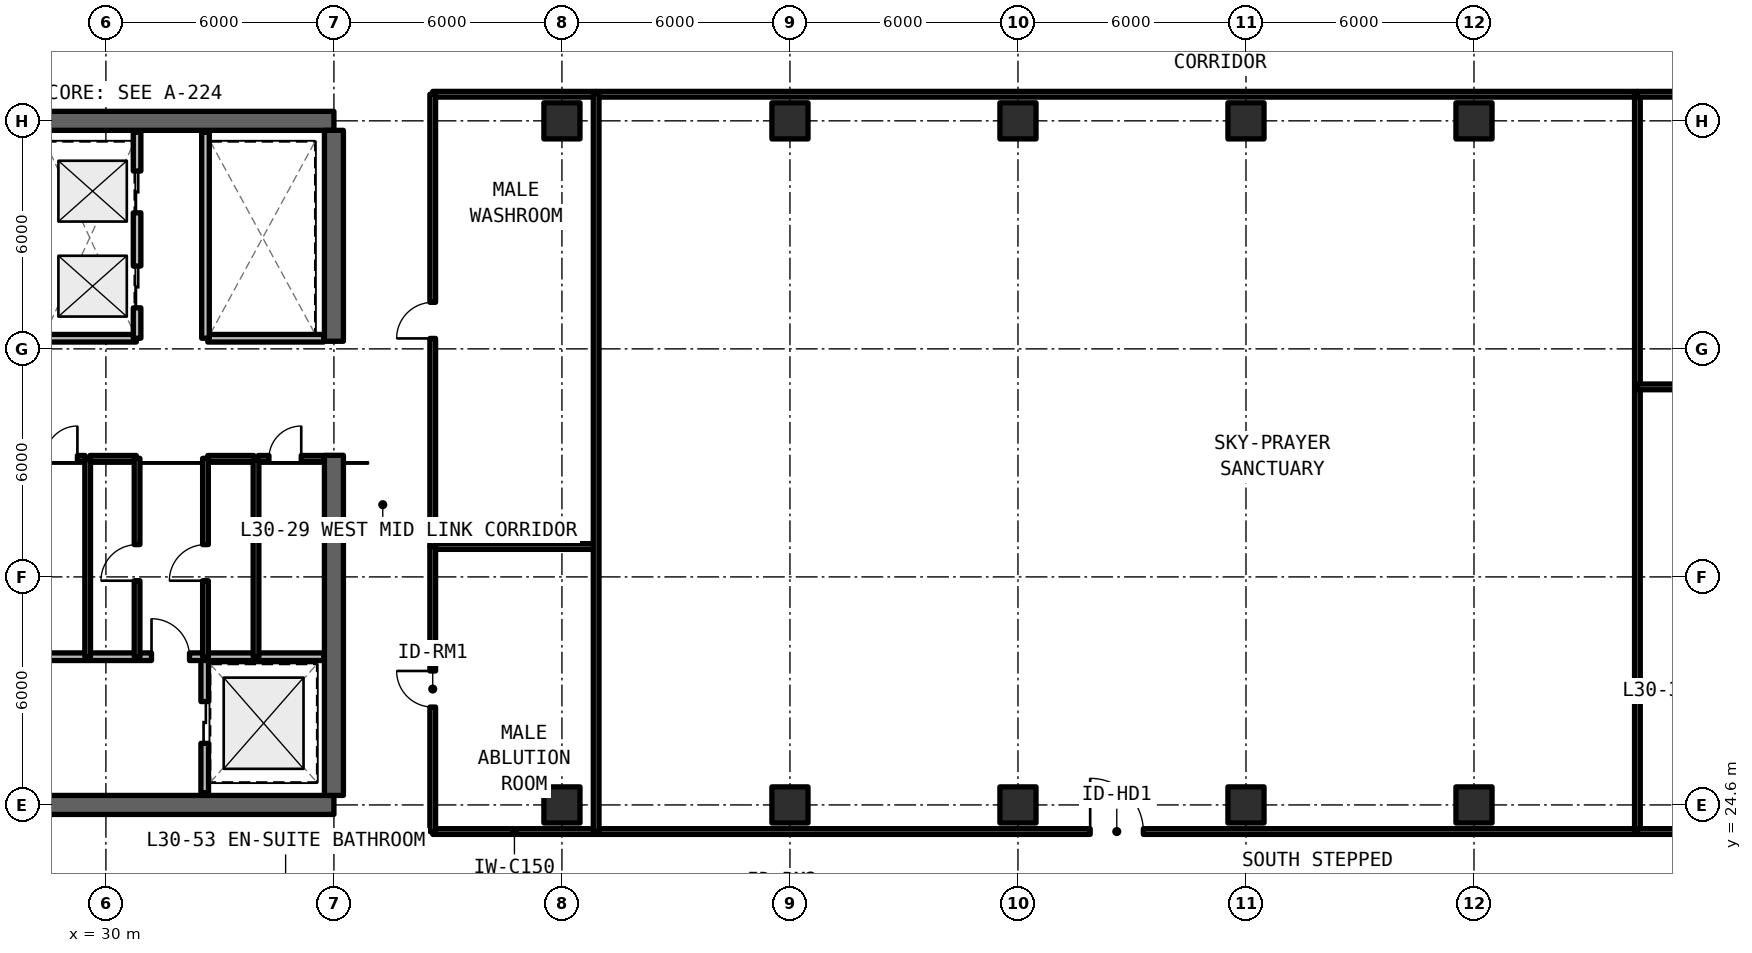
"""IFC4 building model, lengths in metres.
Left out: names, types, materials, properties, quantities, classifications, styles, units other than length and angle.
Written with IfcOpenShell. Run it as: python <this file> out.ifc"""

import sys

from ifc_helpers import new_model, si_unit, direction, frame, frame_2d, origin, origin_2d, place, context, subcontext, project, spatial, rectangle, extrude, element, fill, save


model = new_model("IFC4")
c1 = context("Model", 3, precision=1e-05, world=origin(), true_north=direction((0.0, 1.0)))
c2 = subcontext(c1, "Body", "Model", "MODEL_VIEW")
j1 = project(units=[si_unit("LENGTHUNIT", "METRE"), si_unit("PLANEANGLEUNIT", "RADIAN")], contexts=[c1])
p1 = place(None, origin())
s1 = spatial("IfcSite", under=j1, at=p1, CompositionType="ELEMENT")
p2 = place(p1, origin())
s2 = spatial("IfcBuilding", under=s1, at=p2, CompositionType="ELEMENT")
p3 = place(p2, frame((0.0, 0.0, 108.57)))
s3 = spatial("IfcBuildingStorey", under=s2, at=p3, CompositionType="ELEMENT", Elevation=108.57)
for number, where, z_axis, x_axis in (
    (1, (24.0, 24.6, 0.0), (0.0, 0.0, 1.0), (1.0, 0.0, 0.0)),
    (2, (36.0, 42.6, 0.0), (0.0, 0.0, 1.0), (-1.0, 0.0, 0.0)),
):
    element("IfcWall", number, at=place(p3, frame(where, z_axis=z_axis, x_axis=x_axis)), inside=s3, PredefinedType="SHEAR", context=c2, shape_type="SweptSolid", body=[
        extrude(rectangle(XDim=12.0, YDim=0.5, at=frame_2d((6.0, 0.0))), origin(), (0.0, 0.0, 1.0), 3.63),
    ])
p4 = place(p3, frame((36.0, 24.85, 0.0), z_axis=(0.0, 0.0, 1.0), x_axis=(0.0, 1.0, 0.0)))
e3 = element("IfcWall", 3, at=p4, inside=s3, PredefinedType="SHEAR", context=c2, shape_type="SweptSolid", body=[
    extrude(rectangle(XDim=8.95, YDim=0.5, at=frame_2d((4.475, 0.0))), origin(), (0.0, 0.0, 1.0), 3.63),
])
p5 = place(p3, frame((36.0, 36.8, 0.0), z_axis=(0.0, 0.0, 1.0), x_axis=(0.0, 1.0, 0.0)))
e4 = element("IfcWall", 4, at=p5, inside=s3, PredefinedType="SHEAR", context=c2, shape_type="SweptSolid", body=[
    extrude(rectangle(XDim=5.55, YDim=0.5, at=frame_2d((2.775, 0.0))), origin(), (0.0, 0.0, 1.0), 3.63),
])
for number, where, z_axis, x_axis in (
    (5, (42.0, 24.6, 0.0), (0.0, 0.0, 1.0), (1.0, 0.0, 0.0)),
    (6, (42.0, 42.6, 0.0), (0.0, 0.0, 1.0), (1.0, 0.0, 0.0)),
    (7, (48.0, 24.6, 0.0), (0.0, 0.0, 1.0), (1.0, 0.0, 0.0)),
    (8, (48.0, 42.6, 0.0), (0.0, 0.0, 1.0), (1.0, 0.0, 0.0)),
    (9, (54.0, 24.6, 0.0), (0.0, 0.0, 1.0), (1.0, 0.0, 0.0)),
    (10, (54.0, 42.6, 0.0), (0.0, 0.0, 1.0), (1.0, 0.0, 0.0)),
    (11, (60.0, 24.6, 0.0), (0.0, 0.0, 1.0), (1.0, 0.0, 0.0)),
    (12, (60.0, 42.6, 0.0), (0.0, 0.0, 1.0), (1.0, 0.0, 0.0)),
    (13, (66.0, 24.6, 0.0), (0.0, 0.0, 1.0), (1.0, 0.0, 0.0)),
    (14, (66.0, 42.6, 0.0), (0.0, 0.0, 1.0), (1.0, 0.0, 0.0)),
):
    element("IfcColumn", number, at=place(p3, frame(where, z_axis=z_axis, x_axis=x_axis)), inside=s3, PredefinedType="COLUMN", context=c2, shape_type="SweptSolid", body=[
        extrude(rectangle(XDim=0.95, YDim=0.95, at=origin_2d()), origin(), (0.0, 0.0, 1.0), 3.63),
    ])
p6 = place(p3, frame((32.6, 24.92, 0.0), z_axis=(0.0, 0.0, 1.0), x_axis=(0.0, 1.0, 0.0)))
e15 = element("IfcWall", 15, at=p6, inside=s3, PredefinedType="SOLIDWALL", context=c2, shape_type="SweptSolid", body=[
    extrude(rectangle(XDim=3.58, YDim=0.2, at=frame_2d((1.79, 0.0))), origin(), (0.0, 0.0, 1.0), 2.63),
])
p7 = place(p6, frame((1.3, 0.0, 0.0)))
e16 = element("IfcOpeningElement", 16, at=p7, cuts=e15, PredefinedType="OPENING", context=c2, shape_type="SweptSolid", body=[
    extrude(rectangle(XDim=1.1, YDim=2.2, at=frame_2d((0.55, 1.1))), frame((0.0, 0.11, 0.0), z_axis=(0.0, -1.0, 0.0), x_axis=(1.0, 0.0, 0.0)), (0.0, 0.0, 1.0), 0.22),
])
p8 = place(p3, frame((28.22, 28.5, 0.0), z_axis=(0.0, 0.0, 1.0), x_axis=(1.0, 0.0, 0.0)))
e17 = element("IfcWall", 17, at=p8, inside=s3, PredefinedType="SOLIDWALL", context=c2, shape_type="SweptSolid", body=[
    extrude(rectangle(XDim=7.51, YDim=0.2, at=frame_2d((3.755, 0.0))), origin(), (0.0, 0.0, 1.0), 2.63),
])
p9 = place(p8, frame((2.98, 0.0, 0.0)))
e18 = element("IfcOpeningElement", 18, at=p9, cuts=e17, PredefinedType="OPENING", context=c2, shape_type="SweptSolid", body=[
    extrude(rectangle(XDim=1.0, YDim=2.15, at=frame_2d((0.5, 1.075))), frame((0.0, 0.11, 0.0), z_axis=(0.0, -1.0, 0.0), x_axis=(1.0, 0.0, 0.0)), (0.0, 0.0, 1.0), 0.22),
])
p10 = place(p3, frame((29.52, 28.5, 0.0), z_axis=(0.0, 0.0, 1.0), x_axis=(0.0, 1.0, 0.0)))
e19 = element("IfcWall", 19, at=p10, inside=s3, PredefinedType="SOLIDWALL", context=c2, shape_type="SweptSolid", body=[
    extrude(rectangle(XDim=5.22, YDim=0.15, at=frame_2d((2.61, 0.0))), origin(), (0.0, 0.0, 1.0), 2.63),
])
p11 = place(p3, frame((28.22, 33.72, 0.0), z_axis=(0.0, 0.0, 1.0), x_axis=(1.0, 0.0, 0.0)))
e20 = element("IfcWall", 20, at=p11, inside=s3, PredefinedType="SOLIDWALL", context=c2, shape_type="SweptSolid", body=[
    extrude(rectangle(XDim=1.23, YDim=0.15, at=frame_2d((0.615, 0.0))), origin(), (0.0, 0.0, 1.0), 2.63),
])
p12 = place(p11, frame((0.18, 0.0, 0.0)))
e21 = element("IfcOpeningElement", 21, at=p12, cuts=e20, PredefinedType="OPENING", context=c2, shape_type="SweptSolid", body=[
    extrude(rectangle(XDim=0.85, YDim=2.1, at=frame_2d((0.425, 1.05))), frame((0.0, 0.085, 0.0), z_axis=(0.0, -1.0, 0.0), x_axis=(1.0, 0.0, 0.0)), (0.0, 0.0, 1.0), 0.17),
])
p13 = place(p3, frame((29.58, 33.72, 0.0), z_axis=(0.0, 0.0, 1.0), x_axis=(1.0, 0.0, 0.0)))
e22 = element("IfcWall", 22, at=p13, inside=s3, PredefinedType="SOLIDWALL", context=c2, shape_type="SweptSolid", body=[
    extrude(rectangle(XDim=1.22, YDim=0.15, at=frame_2d((0.61, 0.0))), origin(), (0.0, 0.0, 1.0), 2.63),
])
p14 = place(p3, frame((30.82, 28.5, 0.0), z_axis=(0.0, 0.0, 1.0), x_axis=(0.0, 1.0, 0.0)))
e23 = element("IfcWall", 23, at=p14, inside=s3, PredefinedType="SOLIDWALL", context=c2, shape_type="SweptSolid", body=[
    extrude(rectangle(XDim=5.22, YDim=0.15, at=frame_2d((2.61, 0.0))), origin(), (0.0, 0.0, 1.0), 2.63),
])
p15 = place(p14, frame((2.0, 0.0, 0.0)))
e24 = element("IfcOpeningElement", 24, at=p15, cuts=e23, PredefinedType="OPENING", context=c2, shape_type="SweptSolid", body=[
    extrude(rectangle(XDim=0.95, YDim=2.15, at=frame_2d((0.475, 1.075))), frame((0.0, 0.085, 0.0), z_axis=(0.0, -1.0, 0.0), x_axis=(1.0, 0.0, 0.0)), (0.0, 0.0, 1.0), 0.17),
])
p16 = place(p3, frame((33.95, 28.5, 0.0), z_axis=(0.0, 0.0, 1.0), x_axis=(0.0, 1.0, 0.0)))
e25 = element("IfcWall", 25, at=p16, inside=s3, PredefinedType="SOLIDWALL", context=c2, shape_type="SweptSolid", body=[
    extrude(rectangle(XDim=5.22, YDim=0.15, at=frame_2d((2.61, 0.0))), origin(), (0.0, 0.0, 1.0), 2.63),
])
p17 = place(p3, frame((32.68, 33.72, 0.0), z_axis=(0.0, 0.0, 1.0), x_axis=(1.0, 0.0, 0.0)))
e26 = element("IfcWall", 26, at=p17, inside=s3, PredefinedType="SOLIDWALL", context=c2, shape_type="SweptSolid", body=[
    extrude(rectangle(XDim=1.21, YDim=0.15, at=frame_2d((0.605, 0.0))), origin(), (0.0, 0.0, 1.0), 2.63),
])
p18 = place(p3, frame((34.01, 33.72, 0.0), z_axis=(0.0, 0.0, 1.0), x_axis=(1.0, 0.0, 0.0)))
e27 = element("IfcWall", 27, at=p18, inside=s3, PredefinedType="SOLIDWALL", context=c2, shape_type="SweptSolid", body=[
    extrude(rectangle(XDim=1.72, YDim=0.15, at=frame_2d((0.86, 0.0))), origin(), (0.0, 0.0, 1.0), 2.63),
])
p19 = place(p18, frame((0.28, 0.0, 0.0)))
e28 = element("IfcOpeningElement", 28, at=p19, cuts=e27, PredefinedType="OPENING", context=c2, shape_type="SweptSolid", body=[
    extrude(rectangle(XDim=0.85, YDim=2.1, at=frame_2d((0.425, 1.05))), frame((0.0, 0.085, 0.0), z_axis=(0.0, -1.0, 0.0), x_axis=(1.0, 0.0, 0.0)), (0.0, 0.0, 1.0), 0.17),
])
p20 = place(p3, frame((32.62, 28.5, 0.0), z_axis=(0.0, 0.0, 1.0), x_axis=(0.0, 1.0, 0.0)))
e29 = element("IfcWall", 29, at=p20, inside=s3, PredefinedType="SOLIDWALL", context=c2, shape_type="SweptSolid", body=[
    extrude(rectangle(XDim=5.22, YDim=0.15, at=frame_2d((2.61, 0.0))), origin(), (0.0, 0.0, 1.0), 2.63),
])
p21 = place(p20, frame((2.0, 0.0, 0.0)))
e30 = element("IfcOpeningElement", 30, at=p21, cuts=e29, PredefinedType="OPENING", context=c2, shape_type="SweptSolid", body=[
    extrude(rectangle(XDim=0.95, YDim=2.15, at=frame_2d((0.475, 1.075))), frame((0.0, 0.085, 0.0), z_axis=(0.0, -1.0, 0.0), x_axis=(1.0, 0.0, 0.0)), (0.0, 0.0, 1.0), 0.17),
])
p22 = place(p3, frame((28.22, 36.88, 0.0), z_axis=(0.0, 0.0, 1.0), x_axis=(1.0, 0.0, 0.0)))
e31 = element("IfcWall", 31, at=p22, inside=s3, PredefinedType="SOLIDWALL", context=c2, shape_type="SweptSolid", body=[
    extrude(rectangle(XDim=2.58, YDim=0.2, at=frame_2d((1.29, 0.0))), origin(), (0.0, 0.0, 1.0), 2.63),
])
p23 = place(p3, frame((30.82, 36.88, 0.0), z_axis=(0.0, 0.0, 1.0), x_axis=(0.0, 1.0, 0.0)))
e32 = element("IfcWall", 32, at=p23, inside=s3, PredefinedType="SOLIDWALL", context=c2, shape_type="SweptSolid", body=[
    extrude(rectangle(XDim=5.42, YDim=0.2, at=frame_2d((2.71, 0.0))), origin(), (0.0, 0.0, 1.0), 2.63),
])
p24 = place(p23, frame((0.8, 0.0, 0.0)))
e33 = element("IfcOpeningElement", 33, at=p24, cuts=e32, PredefinedType="OPENING", context=c2, shape_type="SweptSolid", body=[
    extrude(rectangle(XDim=1.1, YDim=2.2, at=frame_2d((0.55, 1.1))), frame((0.0, 0.11, 0.0), z_axis=(0.0, -1.0, 0.0), x_axis=(1.0, 0.0, 0.0)), (0.0, 0.0, 1.0), 0.22),
])
p25 = place(p23, frame((3.3, 0.0, 0.0)))
e34 = element("IfcOpeningElement", 34, at=p25, cuts=e32, PredefinedType="OPENING", context=c2, shape_type="SweptSolid", body=[
    extrude(rectangle(XDim=1.1, YDim=2.2, at=frame_2d((0.55, 1.1))), frame((0.0, 0.11, 0.0), z_axis=(0.0, -1.0, 0.0), x_axis=(1.0, 0.0, 0.0)), (0.0, 0.0, 1.0), 0.22),
])
p26 = place(p3, frame((32.68, 36.88, 0.0), z_axis=(0.0, 0.0, 1.0), x_axis=(1.0, 0.0, 0.0)))
e35 = element("IfcWall", 35, at=p26, inside=s3, PredefinedType="SOLIDWALL", context=c2, shape_type="SweptSolid", body=[
    extrude(rectangle(XDim=3.05, YDim=0.2, at=frame_2d((1.525, 0.0))), origin(), (0.0, 0.0, 1.0), 2.63),
])
p27 = place(p3, frame((32.62, 36.88, 0.0), z_axis=(0.0, 0.0, 1.0), x_axis=(0.0, 1.0, 0.0)))
e36 = element("IfcWall", 36, at=p27, inside=s3, PredefinedType="SOLIDWALL", context=c2, shape_type="SweptSolid", body=[
    extrude(rectangle(XDim=5.42, YDim=0.2, at=frame_2d((2.71, 0.0))), origin(), (0.0, 0.0, 1.0), 2.63),
])
for number, where, z_axis, x_axis in (
    (37, (38.6, 23.9, 0.0), (0.0, 0.0, 1.0), (1.0, 0.0, 0.0)),
    (38, (38.6, 31.4, 0.0), (0.0, 0.0, 1.0), (1.0, 0.0, 0.0)),
):
    element("IfcWall", number, at=place(p3, frame(where, z_axis=z_axis, x_axis=x_axis)), inside=s3, PredefinedType="SOLIDWALL", context=c2, shape_type="SweptSolid", body=[
        extrude(rectangle(XDim=4.3, YDim=0.15, at=frame_2d((2.15, 0.0))), origin(), (0.0, 0.0, 1.0), 2.63),
    ])
p28 = place(p3, frame((38.6, 23.9, 0.0), z_axis=(0.0, 0.0, 1.0), x_axis=(0.0, 1.0, 0.0)))
e39 = element("IfcWall", 39, at=p28, inside=s3, PredefinedType="SOLIDWALL", context=c2, shape_type="SweptSolid", body=[
    extrude(rectangle(XDim=7.5, YDim=0.15, at=frame_2d((3.75, 0.0))), origin(), (0.0, 0.0, 1.0), 2.63),
])
p29 = place(p28, frame((3.275, 0.0, 0.0)))
e40 = element("IfcOpeningElement", 40, at=p29, cuts=e39, PredefinedType="OPENING", context=c2, shape_type="SweptSolid", body=[
    extrude(rectangle(XDim=0.95, YDim=2.15, at=frame_2d((0.475, 1.075))), frame((0.0, 0.085, 0.0), z_axis=(0.0, -1.0, 0.0), x_axis=(1.0, 0.0, 0.0)), (0.0, 0.0, 1.0), 0.17),
])
p30 = place(p3, frame((38.6, 43.3, 0.0), z_axis=(0.0, 0.0, 1.0), x_axis=(1.0, 0.0, 0.0)))
e41 = element("IfcWall", 41, at=p30, inside=s3, PredefinedType="SOLIDWALL", context=c2, shape_type="SweptSolid", body=[
    extrude(rectangle(XDim=4.3, YDim=0.15, at=frame_2d((2.15, 0.0))), origin(), (0.0, 0.0, 1.0), 2.63),
])
p31 = place(p3, frame((38.6, 31.4, 0.0), z_axis=(0.0, 0.0, 1.0), x_axis=(0.0, 1.0, 0.0)))
e42 = element("IfcWall", 42, at=p31, inside=s3, PredefinedType="SOLIDWALL", context=c2, shape_type="SweptSolid", body=[
    extrude(rectangle(XDim=11.9, YDim=0.15, at=frame_2d((5.95, 0.0))), origin(), (0.0, 0.0, 1.0), 2.63),
])
p32 = place(p31, frame((5.475, 0.0, 0.0)))
e43 = element("IfcOpeningElement", 43, at=p32, cuts=e42, PredefinedType="OPENING", context=c2, shape_type="SweptSolid", body=[
    extrude(rectangle(XDim=0.95, YDim=2.15, at=frame_2d((0.475, 1.075))), frame((0.0, 0.085, 0.0), z_axis=(0.0, -1.0, 0.0), x_axis=(1.0, 0.0, 0.0)), (0.0, 0.0, 1.0), 0.17),
])
p33 = place(p3, frame((42.9, 23.9, 0.0), z_axis=(0.0, 0.0, 1.0), x_axis=(1.0, 0.0, 0.0)))
e44 = element("IfcWall", 44, at=p33, inside=s3, PredefinedType="SOLIDWALL", context=c2, shape_type="SweptSolid", body=[
    extrude(rectangle(XDim=27.4, YDim=0.15, at=frame_2d((13.7, 0.0))), origin(), (0.0, 0.0, 1.0), 2.63),
])
p34 = place(p33, frame((13.0, 0.0, 0.0)))
e45 = element("IfcOpeningElement", 45, at=p34, cuts=e44, PredefinedType="OPENING", context=c2, shape_type="SweptSolid", body=[
    extrude(rectangle(XDim=1.4, YDim=2.15, at=frame_2d((0.7, 1.075))), frame((0.0, 0.085, 0.0), z_axis=(0.0, -1.0, 0.0), x_axis=(1.0, 0.0, 0.0)), (0.0, 0.0, 1.0), 0.17),
])
p35 = place(p3, frame((42.9, 43.3, 0.0), z_axis=(0.0, 0.0, 1.0), x_axis=(1.0, 0.0, 0.0)))
e46 = element("IfcWall", 46, at=p35, inside=s3, PredefinedType="SOLIDWALL", context=c2, shape_type="SweptSolid", body=[
    extrude(rectangle(XDim=27.4, YDim=0.15, at=frame_2d((13.7, 0.0))), origin(), (0.0, 0.0, 1.0), 2.63),
])
for number, where, z_axis, x_axis in (
    (47, (42.9, 23.9, 0.0), (0.0, 0.0, 1.0), (0.0, 1.0, 0.0)),
    (48, (70.3, 23.9, 0.0), (0.0, 0.0, 1.0), (0.0, 1.0, 0.0)),
):
    element("IfcWall", number, at=place(p3, frame(where, z_axis=z_axis, x_axis=x_axis)), inside=s3, PredefinedType="SOLIDWALL", context=c2, shape_type="SweptSolid", body=[
        extrude(rectangle(XDim=19.4, YDim=0.15, at=frame_2d((9.7, 0.0))), origin(), (0.0, 0.0, 1.0), 2.63),
    ])
for number, where, z_axis, x_axis in (
    (49, (70.3, 23.9, 0.0), (0.0, 0.0, 1.0), (1.0, 0.0, 0.0)),
    (50, (70.3, 35.6, 0.0), (0.0, 0.0, 1.0), (1.0, 0.0, 0.0)),
    (51, (70.3, 43.3, 0.0), (0.0, 0.0, 1.0), (1.0, 0.0, 0.0)),
):
    element("IfcWall", number, at=place(p3, frame(where, z_axis=z_axis, x_axis=x_axis)), inside=s3, PredefinedType="SOLIDWALL", context=c2, shape_type="SweptSolid", body=[
        extrude(rectangle(XDim=5.1, YDim=0.15, at=frame_2d((2.55, 0.0))), origin(), (0.0, 0.0, 1.0), 2.63),
    ])
p36 = place(p7, origin())
e52 = element("IfcDoor", 52, at=p36, inside=s3, OperationType="SLIDING_TO_LEFT", PredefinedType="DOOR", context=c2, shape_type="SweptSolid", body=[
    extrude(rectangle(XDim=1.1, YDim=2.2, at=frame_2d((0.55, 1.1))), frame((0.0, 0.025, 0.0), z_axis=(0.0, -1.0, 0.0), x_axis=(1.0, 0.0, 0.0)), (0.0, 0.0, 1.0), 0.05),
])
fill(e16, e52)
p37 = place(p9, origin())
e53 = element("IfcDoor", 53, at=p37, inside=s3, OperationType="SINGLE_SWING_LEFT", PredefinedType="DOOR", context=c2, shape_type="SweptSolid", body=[
    extrude(rectangle(XDim=1.0, YDim=2.15, at=frame_2d((0.5, 1.075))), frame((0.0, 0.025, 0.0), z_axis=(0.0, -1.0, 0.0), x_axis=(1.0, 0.0, 0.0)), (0.0, 0.0, 1.0), 0.05),
])
fill(e18, e53)
p38 = place(p12, origin())
e54 = element("IfcDoor", 54, at=p38, inside=s3, OperationType="SINGLE_SWING_RIGHT", PredefinedType="DOOR", context=c2, shape_type="SweptSolid", body=[
    extrude(rectangle(XDim=0.85, YDim=2.1, at=frame_2d((0.425, 1.05))), frame((0.0, 0.025, 0.0), z_axis=(0.0, -1.0, 0.0), x_axis=(1.0, 0.0, 0.0)), (0.0, 0.0, 1.0), 0.05),
])
fill(e21, e54)
p39 = place(p15, origin())
e55 = element("IfcDoor", 55, at=p39, inside=s3, OperationType="SINGLE_SWING_LEFT", PredefinedType="DOOR", context=c2, shape_type="SweptSolid", body=[
    extrude(rectangle(XDim=0.95, YDim=2.15, at=frame_2d((0.475, 1.075))), frame((0.0, 0.025, 0.0), z_axis=(0.0, -1.0, 0.0), x_axis=(1.0, 0.0, 0.0)), (0.0, 0.0, 1.0), 0.05),
])
fill(e24, e55)
p40 = place(p19, origin())
e56 = element("IfcDoor", 56, at=p40, inside=s3, OperationType="SINGLE_SWING_RIGHT", PredefinedType="DOOR", context=c2, shape_type="SweptSolid", body=[
    extrude(rectangle(XDim=0.85, YDim=2.1, at=frame_2d((0.425, 1.05))), frame((0.0, 0.025, 0.0), z_axis=(0.0, -1.0, 0.0), x_axis=(1.0, 0.0, 0.0)), (0.0, 0.0, 1.0), 0.05),
])
fill(e28, e56)
p41 = place(p21, origin())
e57 = element("IfcDoor", 57, at=p41, inside=s3, OperationType="SINGLE_SWING_LEFT", PredefinedType="DOOR", context=c2, shape_type="SweptSolid", body=[
    extrude(rectangle(XDim=0.95, YDim=2.15, at=frame_2d((0.475, 1.075))), frame((0.0, 0.025, 0.0), z_axis=(0.0, -1.0, 0.0), x_axis=(1.0, 0.0, 0.0)), (0.0, 0.0, 1.0), 0.05),
])
fill(e30, e57)
p42 = place(p24, origin())
e58 = element("IfcDoor", 58, at=p42, inside=s3, OperationType="SLIDING_TO_LEFT", PredefinedType="DOOR", context=c2, shape_type="SweptSolid", body=[
    extrude(rectangle(XDim=1.1, YDim=2.2, at=frame_2d((0.55, 1.1))), frame((0.0, 0.025, 0.0), z_axis=(0.0, -1.0, 0.0), x_axis=(1.0, 0.0, 0.0)), (0.0, 0.0, 1.0), 0.05),
])
fill(e33, e58)
p43 = place(p25, origin())
e59 = element("IfcDoor", 59, at=p43, inside=s3, OperationType="SLIDING_TO_RIGHT", PredefinedType="DOOR", context=c2, shape_type="SweptSolid", body=[
    extrude(rectangle(XDim=1.1, YDim=2.2, at=frame_2d((0.55, 1.1))), frame((0.0, 0.025, 0.0), z_axis=(0.0, -1.0, 0.0), x_axis=(1.0, 0.0, 0.0)), (0.0, 0.0, 1.0), 0.05),
])
fill(e34, e59)
p44 = place(p29, origin())
e60 = element("IfcDoor", 60, at=p44, inside=s3, OperationType="SINGLE_SWING_RIGHT", PredefinedType="DOOR", context=c2, shape_type="SweptSolid", body=[
    extrude(rectangle(XDim=0.95, YDim=2.15, at=frame_2d((0.475, 1.075))), frame((0.0, 0.025, 0.0), z_axis=(0.0, -1.0, 0.0), x_axis=(1.0, 0.0, 0.0)), (0.0, 0.0, 1.0), 0.05),
])
fill(e40, e60)
p45 = place(p32, origin())
e61 = element("IfcDoor", 61, at=p45, inside=s3, OperationType="SINGLE_SWING_LEFT", PredefinedType="DOOR", context=c2, shape_type="SweptSolid", body=[
    extrude(rectangle(XDim=0.95, YDim=2.15, at=frame_2d((0.475, 1.075))), frame((0.0, 0.025, 0.0), z_axis=(0.0, -1.0, 0.0), x_axis=(1.0, 0.0, 0.0)), (0.0, 0.0, 1.0), 0.05),
])
fill(e43, e61)
p46 = place(p34, origin())
e62 = element("IfcDoor", 62, at=p46, inside=s3, OperationType="SINGLE_SWING_RIGHT", PredefinedType="DOOR", context=c2, shape_type="SweptSolid", body=[
    extrude(rectangle(XDim=1.4, YDim=2.15, at=frame_2d((0.7, 1.075))), frame((0.0, 0.025, 0.0), z_axis=(0.0, -1.0, 0.0), x_axis=(1.0, 0.0, 0.0)), (0.0, 0.0, 1.0), 0.05),
])
fill(e45, e62)
save(model, sys.argv[1])
